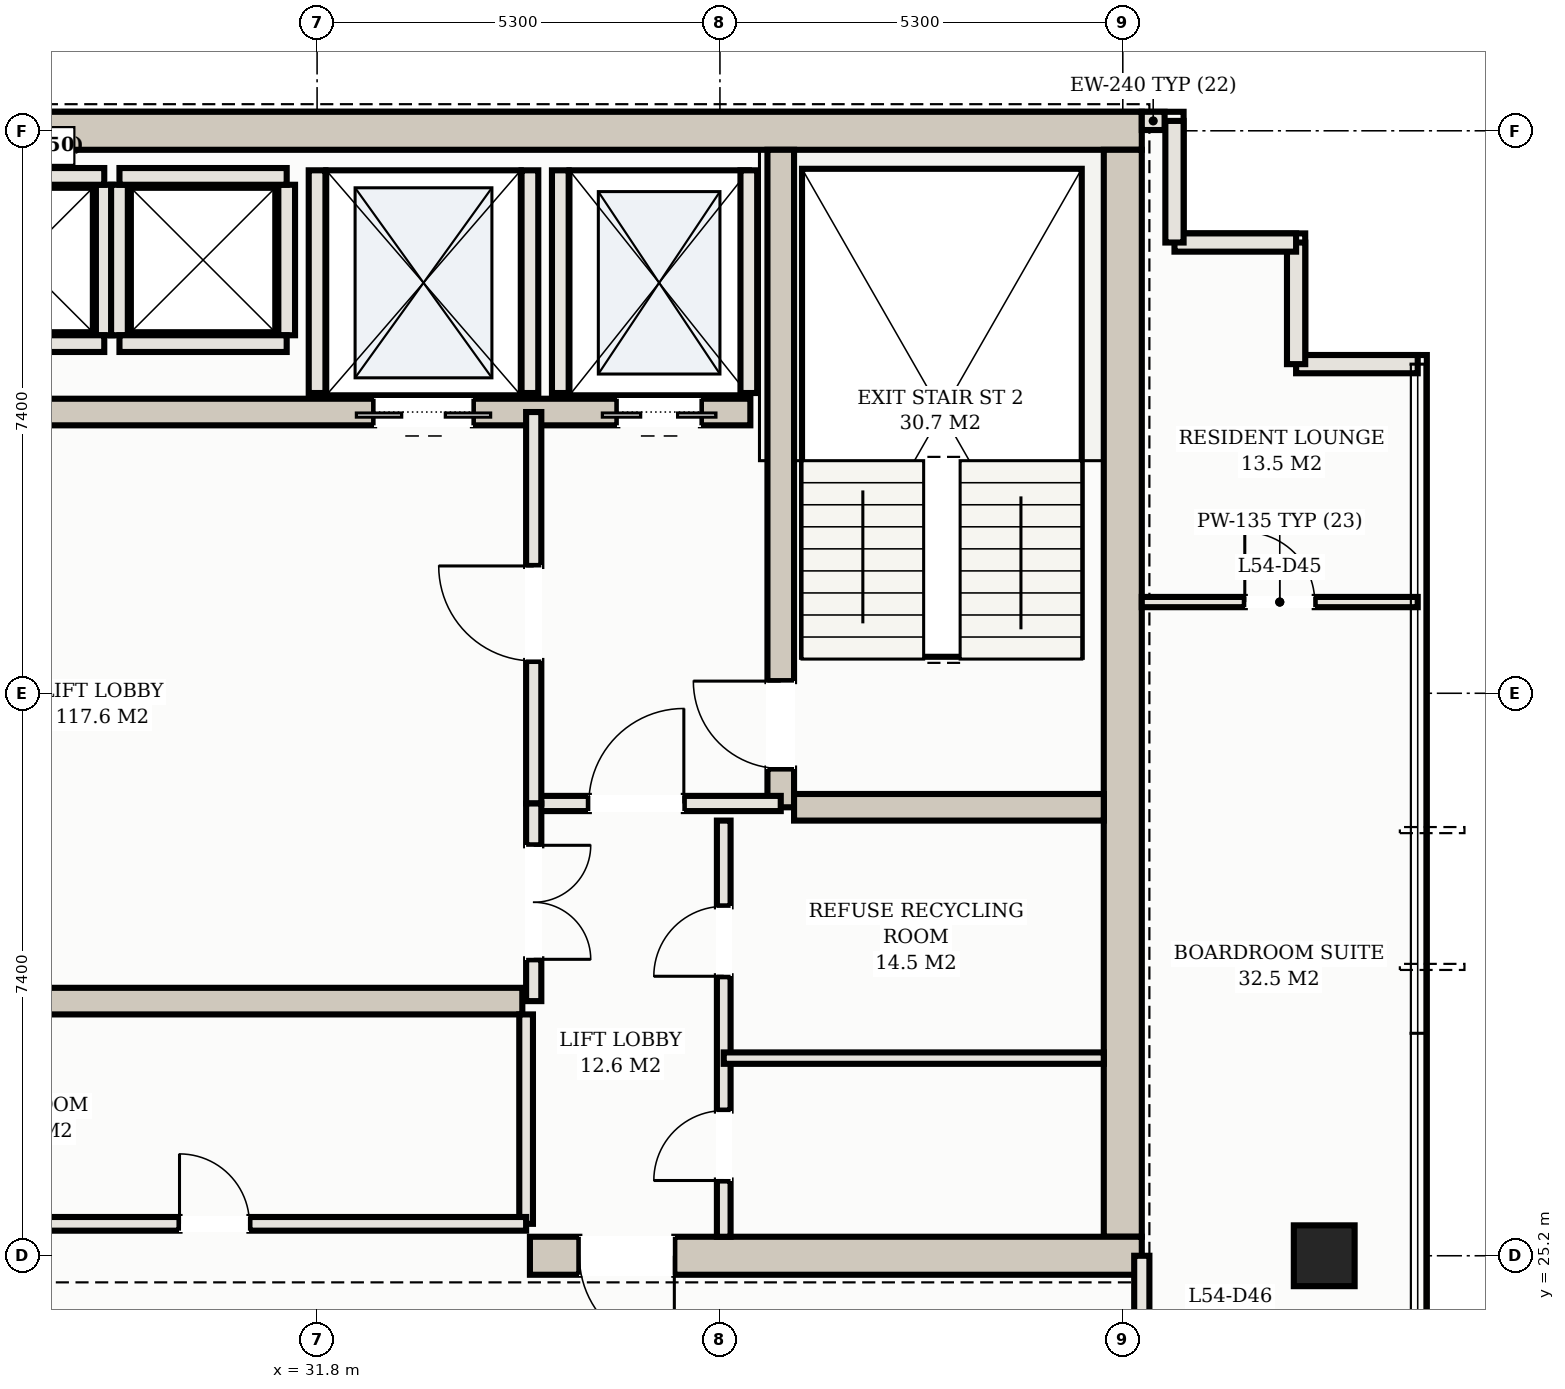
"""IFC4 building model, lengths in metres.
Left out: names, types, materials, properties, quantities, classifications, styles, units other than length and angle.
Written with IfcOpenShell. Run it as: python <this file> out.ifc"""

import sys

from ifc_helpers import new_model, si_unit, direction, frame, frame_2d, origin, origin_2d, place, context, subcontext, project, spatial, rectangle, hollow_rectangle, extrude, element, fill, save


model = new_model("IFC4")
c1 = context("Model", 3, precision=1e-05, world=origin(), true_north=direction((0.0, 1.0)))
c2 = subcontext(c1, "Body", "Model", "MODEL_VIEW")
j1 = project(units=[si_unit("LENGTHUNIT", "METRE"), si_unit("PLANEANGLEUNIT", "RADIAN")], contexts=[c1])
p1 = place(None, origin())
s1 = spatial("IfcSite", under=j1, at=p1, CompositionType="ELEMENT")
p2 = place(p1, origin())
s2 = spatial("IfcBuilding", under=s1, at=p2, CompositionType="ELEMENT")
p3 = place(p2, frame((0.0, 0.0, 200.0)))
s3 = spatial("IfcBuildingStorey", under=s2, at=p3, CompositionType="ELEMENT", Elevation=200.0)
p4 = place(p3, frame((10.35, 40.0, 0.0), z_axis=(0.0, 0.0, 1.0), x_axis=(1.0, 0.0, 0.0)))
e1 = element("IfcWall", 1, at=p4, inside=s3, PredefinedType="SHEAR", context=c2, shape_type="SweptSolid", body=[
    extrude(rectangle(XDim=32.3, YDim=0.5, at=frame_2d((16.15, 0.0))), origin(), (0.0, 0.0, 1.0), 3.11),
])
p5 = place(p3, frame((42.4, 25.45, 0.0), z_axis=(0.0, 0.0, 1.0), x_axis=(0.0, 1.0, 0.0)))
e2 = element("IfcWall", 2, at=p5, inside=s3, PredefinedType="SHEAR", context=c2, shape_type="SweptSolid", body=[
    extrude(rectangle(XDim=14.3, YDim=0.5, at=frame_2d((7.15, 0.0))), origin(), (0.0, 0.0, 1.0), 3.11),
])
p6 = place(p3, frame((34.6, 25.2, 0.0), z_axis=(0.0, 0.0, 1.0), x_axis=(1.0, 0.0, 0.0)))
e3 = element("IfcWall", 3, at=p6, inside=s3, PredefinedType="SHEAR", context=c2, shape_type="SweptSolid", body=[
    extrude(rectangle(XDim=8.05, YDim=0.5, at=frame_2d((4.025, 0.0))), origin(), (0.0, 0.0, 1.0), 3.11),
])
p7 = place(p6, frame((0.65, 0.0, 0.0)))
e4 = element("IfcOpeningElement", 4, at=p7, cuts=e3, PredefinedType="OPENING", context=c2, shape_type="SweptSolid", body=[
    extrude(rectangle(XDim=1.25, YDim=2.2, at=frame_2d((0.625, 1.1))), frame((0.0, 0.26, 0.0), z_axis=(0.0, -1.0, 0.0), x_axis=(1.0, 0.0, 0.0)), (0.0, 0.0, 1.0), 0.52),
])
p8 = place(p3, frame((37.9, 31.1, 0.0), z_axis=(0.0, 0.0, 1.0), x_axis=(0.0, 1.0, 0.0)))
e5 = element("IfcWall", 5, at=p8, inside=s3, PredefinedType="SHEAR", context=c2, shape_type="SweptSolid", body=[
    extrude(rectangle(XDim=8.65, YDim=0.35, at=frame_2d((4.325, 0.0))), origin(), (0.0, 0.0, 1.0), 3.11),
])
p9 = place(p8, frame((0.51, 0.0, 0.0)))
e6 = element("IfcOpeningElement", 6, at=p9, cuts=e5, PredefinedType="OPENING", context=c2, shape_type="SweptSolid", body=[
    extrude(rectangle(XDim=1.15, YDim=2.2, at=frame_2d((0.575, 1.1))), frame((0.0, 0.185, 0.0), z_axis=(0.0, -1.0, 0.0), x_axis=(1.0, 0.0, 0.0)), (0.0, 0.0, 1.0), 0.37),
])
p10 = place(p3, frame((38.075, 31.1, 0.0), z_axis=(0.0, 0.0, 1.0), x_axis=(1.0, 0.0, 0.0)))
e7 = element("IfcWall", 7, at=p10, inside=s3, PredefinedType="SHEAR", context=c2, shape_type="SweptSolid", body=[
    extrude(rectangle(XDim=4.075, YDim=0.35, at=frame_2d((2.038, 0.0))), origin(), (0.0, 0.0, 1.0), 3.11),
])
p11 = place(p3, frame((15.5, 36.3, 0.0), z_axis=(0.0, 0.0, 1.0), x_axis=(1.0, 0.0, 0.0)))
e8 = element("IfcWall", 8, at=p11, inside=s3, PredefinedType="SHEAR", context=c2, shape_type="SweptSolid", body=[
    extrude(rectangle(XDim=22.0, YDim=0.35, at=frame_2d((11.0, 0.0))), origin(), (0.0, 0.0, 1.0), 3.11),
])
p12 = place(p11, frame((0.65, 0.0, 0.0)))
e9 = element("IfcOpeningElement", 9, at=p12, cuts=e8, PredefinedType="OPENING", context=c2, shape_type="SweptSolid", body=[
    extrude(rectangle(XDim=1.1, YDim=2.15, at=frame_2d((0.55, 1.075))), frame((0.0, 0.185, 0.0), z_axis=(0.0, -1.0, 0.0), x_axis=(1.0, 0.0, 0.0)), (0.0, 0.0, 1.0), 0.37),
])
p13 = place(p11, frame((20.25, 0.0, 0.0)))
e10 = element("IfcOpeningElement", 10, at=p13, cuts=e8, PredefinedType="OPENING", context=c2, shape_type="SweptSolid", body=[
    extrude(rectangle(XDim=1.1, YDim=2.15, at=frame_2d((0.55, 1.075))), frame((0.0, 0.185, 0.0), z_axis=(0.0, -1.0, 0.0), x_axis=(1.0, 0.0, 0.0)), (0.0, 0.0, 1.0), 0.37),
])
p14 = place(p11, frame((17.05, 0.0, 0.0)))
e11 = element("IfcOpeningElement", 11, at=p14, cuts=e8, PredefinedType="OPENING", context=c2, shape_type="SweptSolid", body=[
    extrude(rectangle(XDim=1.3, YDim=2.2, at=frame_2d((0.65, 1.1))), frame((0.0, 0.185, 0.0), z_axis=(0.0, -1.0, 0.0), x_axis=(1.0, 0.0, 0.0)), (0.0, 0.0, 1.0), 0.37),
])
p15 = place(p11, frame((3.95, 0.0, 0.0)))
e12 = element("IfcOpeningElement", 12, at=p15, cuts=e8, PredefinedType="OPENING", context=c2, shape_type="SweptSolid", body=[
    extrude(rectangle(XDim=1.1, YDim=2.15, at=frame_2d((0.55, 1.075))), frame((0.0, 0.185, 0.0), z_axis=(0.0, -1.0, 0.0), x_axis=(1.0, 0.0, 0.0)), (0.0, 0.0, 1.0), 0.37),
])
p16 = place(p11, frame((6.55, 0.0, 0.0)))
e13 = element("IfcOpeningElement", 13, at=p16, cuts=e8, PredefinedType="OPENING", context=c2, shape_type="SweptSolid", body=[
    extrude(rectangle(XDim=1.1, YDim=2.15, at=frame_2d((0.55, 1.075))), frame((0.0, 0.185, 0.0), z_axis=(0.0, -1.0, 0.0), x_axis=(1.0, 0.0, 0.0)), (0.0, 0.0, 1.0), 0.37),
])
p17 = place(p11, frame((9.15, 0.0, 0.0)))
e14 = element("IfcOpeningElement", 14, at=p17, cuts=e8, PredefinedType="OPENING", context=c2, shape_type="SweptSolid", body=[
    extrude(rectangle(XDim=1.1, YDim=2.15, at=frame_2d((0.55, 1.075))), frame((0.0, 0.185, 0.0), z_axis=(0.0, -1.0, 0.0), x_axis=(1.0, 0.0, 0.0)), (0.0, 0.0, 1.0), 0.37),
])
p18 = place(p3, frame((18.5, 28.55, 0.0), z_axis=(0.0, 0.0, 1.0), x_axis=(1.0, 0.0, 0.0)))
e15 = element("IfcWall", 15, at=p18, inside=s3, PredefinedType="SHEAR", context=c2, shape_type="SweptSolid", body=[
    extrude(rectangle(XDim=16.0, YDim=0.35, at=frame_2d((8.0, 0.0))), origin(), (0.0, 0.0, 1.0), 3.11),
])
p19 = place(p3, frame((45.05, 25.2, 0.0), z_axis=(0.0, 0.0, 1.0), x_axis=(1.0, 0.0, 0.0)))
e16 = element("IfcColumn", 16, at=p19, inside=s3, PredefinedType="COLUMN", context=c2, shape_type="SweptSolid", body=[
    extrude(hollow_rectangle(XDim=0.8, YDim=0.8, WallThickness=0.028, at=origin_2d()), origin(), (0.0, 0.0, 1.0), 3.3),
])
for number, where, z_axis, x_axis in (
    (17, (35.0, 36.55, 0.0), (0.0, 0.0, 1.0), (0.0, 1.0, 0.0)),
    (18, (37.48, 36.55, 0.0), (0.0, 0.0, 1.0), (0.0, 1.0, 0.0)),
    (19, (31.8, 36.55, 0.0), (0.0, 0.0, 1.0), (0.0, 1.0, 0.0)),
    (20, (34.6, 36.55, 0.0), (0.0, 0.0, 1.0), (0.0, 1.0, 0.0)),
):
    element("IfcWall", number, at=place(p3, frame(where, z_axis=z_axis, x_axis=x_axis)), inside=s3, PredefinedType="SOLIDWALL", context=c2, shape_type="SweptSolid", body=[
        extrude(rectangle(XDim=2.93, YDim=0.22, at=frame_2d((1.465, 0.0))), origin(), (0.0, 0.0, 1.0), 3.11),
    ])
p20 = place(p3, frame((29.0, 37.31, 0.0), z_axis=(0.0, 0.0, 1.0), x_axis=(0.0, 1.0, 0.0)))
e21 = element("IfcWall", 21, at=p20, inside=s3, PredefinedType="SOLIDWALL", context=c2, shape_type="SweptSolid", body=[
    extrude(rectangle(XDim=1.98, YDim=0.22, at=frame_2d((0.99, 0.0))), origin(), (0.0, 0.0, 1.0), 3.11),
])
for number, where, z_axis, x_axis in (
    (22, (26.8, 39.4, 0.0), (0.0, 0.0, 1.0), (1.0, 0.0, 0.0)),
    (23, (26.8, 37.2, 0.0), (0.0, 0.0, 1.0), (1.0, 0.0, 0.0)),
):
    element("IfcWall", number, at=place(p3, frame(where, z_axis=z_axis, x_axis=x_axis)), inside=s3, PredefinedType="SOLIDWALL", context=c2, shape_type="SweptSolid", body=[
        extrude(rectangle(XDim=2.2, YDim=0.22, at=frame_2d((1.1, 0.0))), origin(), (0.0, 0.0, 1.0), 3.11),
    ])
for number, where, z_axis, x_axis in (
    (24, (29.2, 37.31, 0.0), (0.0, 0.0, 1.0), (0.0, 1.0, 0.0)),
    (25, (31.4, 37.31, 0.0), (0.0, 0.0, 1.0), (0.0, 1.0, 0.0)),
):
    element("IfcWall", number, at=place(p3, frame(where, z_axis=z_axis, x_axis=x_axis)), inside=s3, PredefinedType="SOLIDWALL", context=c2, shape_type="SweptSolid", body=[
        extrude(rectangle(XDim=1.98, YDim=0.22, at=frame_2d((0.99, 0.0))), origin(), (0.0, 0.0, 1.0), 3.11),
    ])
for number, where, z_axis, x_axis in (
    (26, (29.2, 39.4, 0.0), (0.0, 0.0, 1.0), (1.0, 0.0, 0.0)),
    (27, (29.2, 37.2, 0.0), (0.0, 0.0, 1.0), (1.0, 0.0, 0.0)),
):
    element("IfcWall", number, at=place(p3, frame(where, z_axis=z_axis, x_axis=x_axis)), inside=s3, PredefinedType="SOLIDWALL", context=c2, shape_type="SweptSolid", body=[
        extrude(rectangle(XDim=2.2, YDim=0.22, at=frame_2d((1.1, 0.0))), origin(), (0.0, 0.0, 1.0), 3.11),
    ])
for number, where, z_axis, x_axis in (
    (28, (46.28, 36.93, 0.0), (0.0, 0.0, 1.0), (-1.0, 0.0, 0.0)),
    (29, (44.68, 36.93, 0.0), (0.0, 0.0, 1.0), (0.0, 1.0, 0.0)),
):
    element("IfcWall", number, at=place(p3, frame(where, z_axis=z_axis, x_axis=x_axis)), inside=s3, PredefinedType="SOLIDWALL", context=c2, shape_type="SweptSolid", body=[
        extrude(rectangle(XDim=1.6, YDim=0.24, at=frame_2d((0.8, 0.0))), origin(), (0.0, 0.0, 1.0), 3.11),
    ])
for number, where, z_axis, x_axis in (
    (30, (44.68, 38.53, 0.0), (0.0, 0.0, 1.0), (-1.0, 0.0, 0.0)),
    (31, (43.08, 38.53, 0.0), (0.0, 0.0, 1.0), (0.0, 1.0, 0.0)),
):
    element("IfcWall", number, at=place(p3, frame(where, z_axis=z_axis, x_axis=x_axis)), inside=s3, PredefinedType="SOLIDWALL", context=c2, shape_type="SweptSolid", body=[
        extrude(rectangle(XDim=1.6, YDim=0.24, at=frame_2d((0.8, 0.0))), origin(), (0.0, 0.0, 1.0), 3.11),
    ])
p21 = place(p3, frame((42.95, 40.13, 0.0), z_axis=(0.0, 0.0, 1.0), x_axis=(-1.0, 0.0, 0.0)))
e32 = element("IfcWall", 32, at=p21, inside=s3, PredefinedType="SOLIDWALL", context=c2, shape_type="SweptSolid", body=[
    extrude(rectangle(XDim=0.3, YDim=0.24, at=frame_2d((0.15, 0.0))), origin(), (0.0, 0.0, 1.0), 3.11),
])
p22 = place(p3, frame((34.65, 31.15, 0.0), z_axis=(0.0, 0.0, 1.0), x_axis=(1.0, 0.0, 0.0)))
e33 = element("IfcWall", 33, at=p22, inside=s3, PredefinedType="PARTITIONING", context=c2, shape_type="SweptSolid", body=[
    extrude(rectangle(XDim=3.25, YDim=0.2, at=frame_2d((1.625, 0.0))), origin(), (0.0, 0.0, 1.0), 2.43),
])
p23 = place(p22, frame((0.725, 0.0, 0.0)))
e34 = element("IfcOpeningElement", 34, at=p23, cuts=e33, PredefinedType="OPENING", context=c2, shape_type="SweptSolid", body=[
    extrude(rectangle(XDim=1.25, YDim=2.2, at=frame_2d((0.625, 1.1))), frame((0.0, 0.11, 0.0), z_axis=(0.0, -1.0, 0.0), x_axis=(1.0, 0.0, 0.0)), (0.0, 0.0, 1.0), 0.22),
])
p24 = place(p3, frame((34.65, 31.15, 0.0), z_axis=(0.0, 0.0, 1.0), x_axis=(0.0, 1.0, 0.0)))
e35 = element("IfcWall", 35, at=p24, inside=s3, PredefinedType="PARTITIONING", context=c2, shape_type="SweptSolid", body=[
    extrude(rectangle(XDim=5.15, YDim=0.2, at=frame_2d((2.575, 0.0))), origin(), (0.0, 0.0, 1.0), 2.43),
])
p25 = place(p24, frame((1.875, 0.0, 0.0)))
e36 = element("IfcOpeningElement", 36, at=p25, cuts=e35, PredefinedType="OPENING", context=c2, shape_type="SweptSolid", body=[
    extrude(rectangle(XDim=1.25, YDim=2.2, at=frame_2d((0.625, 1.1))), frame((0.0, 0.11, 0.0), z_axis=(0.0, -1.0, 0.0), x_axis=(1.0, 0.0, 0.0)), (0.0, 0.0, 1.0), 0.22),
])
p26 = place(p3, frame((37.15, 25.45, 0.0), z_axis=(0.0, 0.0, 1.0), x_axis=(0.0, 1.0, 0.0)))
e37 = element("IfcWall", 37, at=p26, inside=s3, PredefinedType="PARTITIONING", context=c2, shape_type="SweptSolid", body=[
    extrude(rectangle(XDim=5.475, YDim=0.18, at=frame_2d((2.738, 0.0))), origin(), (0.0, 0.0, 1.0), 2.43),
])
p27 = place(p26, frame((0.74, 0.0, 0.0)))
e38 = element("IfcOpeningElement", 38, at=p27, cuts=e37, PredefinedType="OPENING", context=c2, shape_type="SweptSolid", body=[
    extrude(rectangle(XDim=0.92, YDim=2.15, at=frame_2d((0.46, 1.075))), frame((0.0, 0.1, 0.0), z_axis=(0.0, -1.0, 0.0), x_axis=(1.0, 0.0, 0.0)), (0.0, 0.0, 1.0), 0.2),
])
p28 = place(p26, frame((3.427, 0.0, 0.0)))
e39 = element("IfcOpeningElement", 39, at=p28, cuts=e37, PredefinedType="OPENING", context=c2, shape_type="SweptSolid", body=[
    extrude(rectangle(XDim=0.92, YDim=2.15, at=frame_2d((0.46, 1.075))), frame((0.0, 0.1, 0.0), z_axis=(0.0, -1.0, 0.0), x_axis=(1.0, 0.0, 0.0)), (0.0, 0.0, 1.0), 0.2),
])
p29 = place(p3, frame((37.15, 27.8, 0.0), z_axis=(0.0, 0.0, 1.0), x_axis=(1.0, 0.0, 0.0)))
e40 = element("IfcWall", 40, at=p29, inside=s3, PredefinedType="PARTITIONING", context=c2, shape_type="SweptSolid", body=[
    extrude(rectangle(XDim=5.0, YDim=0.15, at=frame_2d((2.5, 0.0))), origin(), (0.0, 0.0, 1.0), 2.43),
])
p30 = place(p3, frame((34.65, 28.55, 0.0), z_axis=(0.0, 0.0, 1.0), x_axis=(0.0, 1.0, 0.0)))
e41 = element("IfcWall", 41, at=p30, inside=s3, PredefinedType="PARTITIONING", context=c2, shape_type="SweptSolid", body=[
    extrude(rectangle(XDim=2.6, YDim=0.2, at=frame_2d((1.3, 0.0))), origin(), (0.0, 0.0, 1.0), 2.43),
])
p31 = place(p30, frame((0.55, 0.0, 0.0)))
e42 = element("IfcOpeningElement", 42, at=p31, cuts=e41, PredefinedType="OPENING", context=c2, shape_type="SweptSolid", body=[
    extrude(rectangle(XDim=1.5, YDim=2.25, at=frame_2d((0.75, 1.125))), frame((0.0, 0.11, 0.0), z_axis=(0.0, -1.0, 0.0), x_axis=(1.0, 0.0, 0.0)), (0.0, 0.0, 1.0), 0.22),
])
p32 = place(p3, frame((34.55, 25.62, 0.0), z_axis=(0.0, 0.0, 1.0), x_axis=(0.0, 1.0, 0.0)))
e43 = element("IfcWall", 43, at=p32, inside=s3, PredefinedType="PARTITIONING", context=c2, shape_type="SweptSolid", body=[
    extrude(rectangle(XDim=2.755, YDim=0.18, at=frame_2d((1.377, 0.0))), origin(), (0.0, 0.0, 1.0), 2.43),
])
p33 = place(p3, frame((26.65, 25.62, 0.0), z_axis=(0.0, 0.0, 1.0), x_axis=(1.0, 0.0, 0.0)))
e44 = element("IfcWall", 44, at=p33, inside=s3, PredefinedType="PARTITIONING", context=c2, shape_type="SweptSolid", body=[
    extrude(rectangle(XDim=7.9, YDim=0.18, at=frame_2d((3.95, 0.0))), origin(), (0.0, 0.0, 1.0), 2.43),
])
p34 = place(p33, frame((3.34, 0.0, 0.0)))
e45 = element("IfcOpeningElement", 45, at=p34, cuts=e44, PredefinedType="OPENING", context=c2, shape_type="SweptSolid", body=[
    extrude(rectangle(XDim=0.92, YDim=2.15, at=frame_2d((0.46, 1.075))), frame((0.0, 0.1, 0.0), z_axis=(0.0, -1.0, 0.0), x_axis=(1.0, 0.0, 0.0)), (0.0, 0.0, 1.0), 0.2),
])
p35 = place(p3, frame((42.65, 24.2, 0.0), z_axis=(0.0, 0.0, 1.0), x_axis=(0.0, 1.0, 0.0)))
e46 = element("IfcWall", 46, at=p35, inside=s3, PredefinedType="PARTITIONING", context=c2, shape_type="SweptSolid", body=[
    extrude(rectangle(XDim=1.0, YDim=0.2, at=frame_2d((0.5, 0.0))), origin(), (0.0, 0.0, 1.0), 2.43),
])
p36 = place(p3, frame((42.65, 33.8, 0.0), z_axis=(0.0, 0.0, 1.0), x_axis=(1.0, 0.0, 0.0)))
e47 = element("IfcWall", 47, at=p36, inside=s3, PredefinedType="PARTITIONING", context=c2, shape_type="SweptSolid", body=[
    extrude(rectangle(XDim=3.63, YDim=0.135, at=frame_2d((1.815, 0.0))), origin(), (0.0, 0.0, 1.0), 2.43),
])
p37 = place(p36, frame((1.355, 0.0, 0.0)))
e48 = element("IfcOpeningElement", 48, at=p37, cuts=e47, PredefinedType="OPENING", context=c2, shape_type="SweptSolid", body=[
    extrude(rectangle(XDim=0.92, YDim=2.15, at=frame_2d((0.46, 1.075))), frame((0.0, 0.078, 0.0), z_axis=(0.0, -1.0, 0.0), x_axis=(1.0, 0.0, 0.0)), (0.0, 0.0, 1.0), 0.155),
])
p38 = place(p13, frame((1.1, 0.0, 0.0), z_axis=(0.0, 0.0, 1.0), x_axis=(-1.0, 0.0, 0.0)))
e49 = element("IfcDoor", 49, at=p38, inside=s3, OperationType="DOUBLE_DOOR_SLIDING", PredefinedType="DOOR", context=c2, shape_type="SweptSolid", body=[
    extrude(rectangle(XDim=1.1, YDim=2.15, at=frame_2d((0.55, 1.075))), frame((0.0, 0.025, 0.0), z_axis=(0.0, -1.0, 0.0), x_axis=(1.0, 0.0, 0.0)), (0.0, 0.0, 1.0), 0.05),
])
fill(e10, e49)
p39 = place(p14, frame((1.3, 0.0, 0.0), z_axis=(0.0, 0.0, 1.0), x_axis=(-1.0, 0.0, 0.0)))
e50 = element("IfcDoor", 50, at=p39, inside=s3, OperationType="DOUBLE_DOOR_SLIDING", PredefinedType="DOOR", context=c2, shape_type="SweptSolid", body=[
    extrude(rectangle(XDim=1.3, YDim=2.2, at=frame_2d((0.65, 1.1))), frame((0.0, 0.025, 0.0), z_axis=(0.0, -1.0, 0.0), x_axis=(1.0, 0.0, 0.0)), (0.0, 0.0, 1.0), 0.05),
])
fill(e11, e50)
p40 = place(p7, frame((1.25, 0.0, 0.0), z_axis=(0.0, 0.0, 1.0), x_axis=(-1.0, 0.0, 0.0)))
e51 = element("IfcDoor", 51, at=p40, inside=s3, OperationType="SINGLE_SWING_LEFT", PredefinedType="DOOR", context=c2, shape_type="SweptSolid", body=[
    extrude(rectangle(XDim=1.25, YDim=2.2, at=frame_2d((0.625, 1.1))), frame((0.0, 0.025, 0.0), z_axis=(0.0, -1.0, 0.0), x_axis=(1.0, 0.0, 0.0)), (0.0, 0.0, 1.0), 0.05),
])
fill(e4, e51)
p41 = place(p23, origin())
e52 = element("IfcDoor", 52, at=p41, inside=s3, OperationType="SINGLE_SWING_RIGHT", PredefinedType="DOOR", context=c2, shape_type="SweptSolid", body=[
    extrude(rectangle(XDim=1.25, YDim=2.2, at=frame_2d((0.625, 1.1))), frame((0.0, 0.025, 0.0), z_axis=(0.0, -1.0, 0.0), x_axis=(1.0, 0.0, 0.0)), (0.0, 0.0, 1.0), 0.05),
])
fill(e34, e52)
p42 = place(p25, origin())
e53 = element("IfcDoor", 53, at=p42, inside=s3, OperationType="SINGLE_SWING_RIGHT", PredefinedType="DOOR", context=c2, shape_type="SweptSolid", body=[
    extrude(rectangle(XDim=1.25, YDim=2.2, at=frame_2d((0.625, 1.1))), frame((0.0, 0.025, 0.0), z_axis=(0.0, -1.0, 0.0), x_axis=(1.0, 0.0, 0.0)), (0.0, 0.0, 1.0), 0.05),
])
fill(e36, e53)
p43 = place(p9, origin())
e54 = element("IfcDoor", 54, at=p43, inside=s3, OperationType="SINGLE_SWING_RIGHT", PredefinedType="DOOR", context=c2, shape_type="SweptSolid", body=[
    extrude(rectangle(XDim=1.15, YDim=2.2, at=frame_2d((0.575, 1.1))), frame((0.0, 0.025, 0.0), z_axis=(0.0, -1.0, 0.0), x_axis=(1.0, 0.0, 0.0)), (0.0, 0.0, 1.0), 0.05),
])
fill(e6, e54)
p44 = place(p27, origin())
e55 = element("IfcDoor", 55, at=p44, inside=s3, OperationType="SINGLE_SWING_LEFT", PredefinedType="DOOR", context=c2, shape_type="SweptSolid", body=[
    extrude(rectangle(XDim=0.92, YDim=2.15, at=frame_2d((0.46, 1.075))), frame((0.0, 0.025, 0.0), z_axis=(0.0, -1.0, 0.0), x_axis=(1.0, 0.0, 0.0)), (0.0, 0.0, 1.0), 0.05),
])
fill(e38, e55)
p45 = place(p28, origin())
e56 = element("IfcDoor", 56, at=p45, inside=s3, OperationType="SINGLE_SWING_LEFT", PredefinedType="DOOR", context=c2, shape_type="SweptSolid", body=[
    extrude(rectangle(XDim=0.92, YDim=2.15, at=frame_2d((0.46, 1.075))), frame((0.0, 0.025, 0.0), z_axis=(0.0, -1.0, 0.0), x_axis=(1.0, 0.0, 0.0)), (0.0, 0.0, 1.0), 0.05),
])
fill(e39, e56)
p46 = place(p31, frame((1.5, 0.0, 0.0), z_axis=(0.0, 0.0, 1.0), x_axis=(-1.0, 0.0, 0.0)))
e57 = element("IfcDoor", 57, at=p46, inside=s3, OperationType="DOUBLE_DOOR_SINGLE_SWING", PredefinedType="DOOR", context=c2, shape_type="SweptSolid", body=[
    extrude(rectangle(XDim=1.5, YDim=2.25, at=frame_2d((0.75, 1.125))), frame((0.0, 0.025, 0.0), z_axis=(0.0, -1.0, 0.0), x_axis=(1.0, 0.0, 0.0)), (0.0, 0.0, 1.0), 0.05),
])
fill(e42, e57)
p47 = place(p34, origin())
e58 = element("IfcDoor", 58, at=p47, inside=s3, OperationType="SINGLE_SWING_LEFT", PredefinedType="DOOR", context=c2, shape_type="SweptSolid", body=[
    extrude(rectangle(XDim=0.92, YDim=2.15, at=frame_2d((0.46, 1.075))), frame((0.0, 0.025, 0.0), z_axis=(0.0, -1.0, 0.0), x_axis=(1.0, 0.0, 0.0)), (0.0, 0.0, 1.0), 0.05),
])
fill(e45, e58)
p48 = place(p37, origin())
e59 = element("IfcDoor", 59, at=p48, inside=s3, OperationType="SINGLE_SWING_LEFT", PredefinedType="DOOR", context=c2, shape_type="SweptSolid", body=[
    extrude(rectangle(XDim=0.92, YDim=2.15, at=frame_2d((0.46, 1.075))), frame((0.0, 0.025, 0.0), z_axis=(0.0, -1.0, 0.0), x_axis=(1.0, 0.0, 0.0)), (0.0, 0.0, 1.0), 0.05),
])
fill(e48, e59)
save(model, sys.argv[1])
